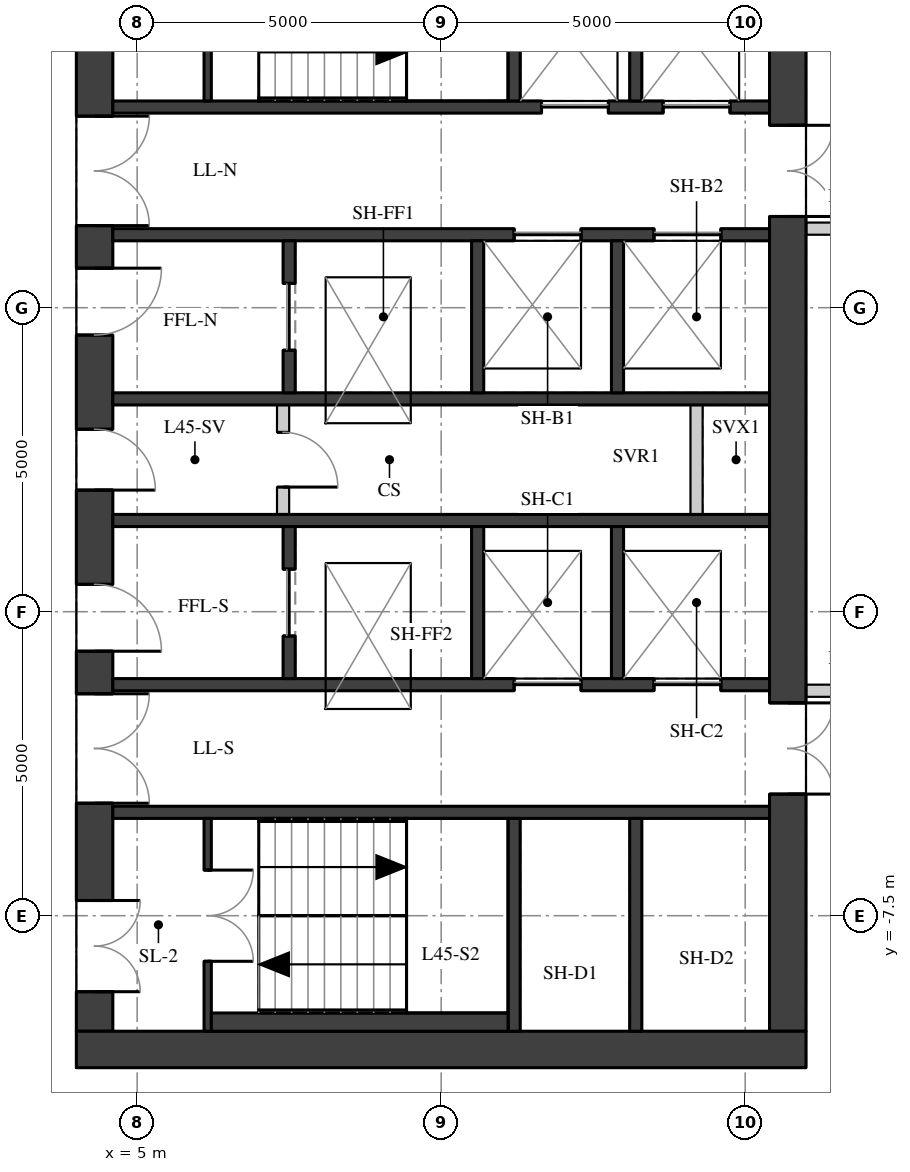
"""IFC4 building model, lengths in metres.
Left out: names, types, materials, properties, quantities, classifications, styles, units other than length and angle.
Written with IfcOpenShell. Run it as: python <this file> out.ifc"""

import sys

from ifc_helpers import new_model, si_unit, direction, frame, frame_2d, origin, place, context, subcontext, project, spatial, rectangle, extrude, element, fill, save


model = new_model("IFC4")
c1 = context("Model", 3, precision=1e-05, world=origin(), true_north=direction((0.0, 1.0)))
c2 = subcontext(c1, "Body", "Model", "MODEL_VIEW")
j1 = project(units=[si_unit("LENGTHUNIT", "METRE"), si_unit("PLANEANGLEUNIT", "RADIAN")], contexts=[c1])
p1 = place(None, origin())
s1 = spatial("IfcSite", under=j1, at=p1, CompositionType="ELEMENT")
p2 = place(p1, origin())
s2 = spatial("IfcBuilding", under=s1, at=p2, CompositionType="ELEMENT")
p3 = place(p2, frame((0.0, 0.0, 161.6)))
s3 = spatial("IfcBuildingStorey", under=s2, at=p3, CompositionType="ELEMENT", Elevation=161.6)
p4 = place(p3, frame((4.3, -9.4, 0.0), z_axis=(0.0, 0.0, 1.0), x_axis=(0.0, 1.0, 0.0)))
e1 = element("IfcWall", 1, at=p4, inside=s3, PredefinedType="SHEAR", context=c2, shape_type="SweptSolid", body=[
    extrude(rectangle(XDim=18.8, YDim=0.6, at=frame_2d((9.4, 0.0))), origin(), (0.0, 0.0, 1.0), 3.02),
])
p5 = place(p4, frame((0.65, 0.0, 0.0)))
e2 = element("IfcOpeningElement", 2, at=p5, cuts=e1, PredefinedType="OPENING", context=c2, shape_type="SweptSolid", body=[
    extrude(rectangle(XDim=1.5, YDim=2.1, at=frame_2d((0.75, 1.05))), frame((0.0, 0.31, 0.0), z_axis=(0.0, -1.0, 0.0), x_axis=(1.0, 0.0, 0.0)), (0.0, 0.0, 1.0), 0.62),
])
p6 = place(p4, frame((3.75, 0.0, 0.0)))
e3 = element("IfcOpeningElement", 3, at=p6, cuts=e1, PredefinedType="OPENING", context=c2, shape_type="SweptSolid", body=[
    extrude(rectangle(XDim=1.8, YDim=2.1, at=frame_2d((0.9, 1.05))), frame((0.0, 0.31, 0.0), z_axis=(0.0, -1.0, 0.0), x_axis=(1.0, 0.0, 0.0)), (0.0, 0.0, 1.0), 0.62),
])
p7 = place(p4, frame((6.25, 0.0, 0.0)))
e4 = element("IfcOpeningElement", 4, at=p7, cuts=e1, PredefinedType="OPENING", context=c2, shape_type="SweptSolid", body=[
    extrude(rectangle(XDim=1.1, YDim=2.1, at=frame_2d((0.55, 1.05))), frame((0.0, 0.31, 0.0), z_axis=(0.0, -1.0, 0.0), x_axis=(1.0, 0.0, 0.0)), (0.0, 0.0, 1.0), 0.62),
])
p8 = place(p4, frame((8.9, 0.0, 0.0)))
e5 = element("IfcOpeningElement", 5, at=p8, cuts=e1, PredefinedType="OPENING", context=c2, shape_type="SweptSolid", body=[
    extrude(rectangle(XDim=1.0, YDim=2.1, at=frame_2d((0.5, 1.05))), frame((0.0, 0.31, 0.0), z_axis=(0.0, -1.0, 0.0), x_axis=(1.0, 0.0, 0.0)), (0.0, 0.0, 1.0), 0.62),
])
p9 = place(p4, frame((11.45, 0.0, 0.0)))
e6 = element("IfcOpeningElement", 6, at=p9, cuts=e1, PredefinedType="OPENING", context=c2, shape_type="SweptSolid", body=[
    extrude(rectangle(XDim=1.1, YDim=2.1, at=frame_2d((0.55, 1.05))), frame((0.0, 0.31, 0.0), z_axis=(0.0, -1.0, 0.0), x_axis=(1.0, 0.0, 0.0)), (0.0, 0.0, 1.0), 0.62),
])
p10 = place(p4, frame((13.25, 0.0, 0.0)))
e7 = element("IfcOpeningElement", 7, at=p10, cuts=e1, PredefinedType="OPENING", context=c2, shape_type="SweptSolid", body=[
    extrude(rectangle(XDim=1.8, YDim=2.1, at=frame_2d((0.9, 1.05))), frame((0.0, 0.31, 0.0), z_axis=(0.0, -1.0, 0.0), x_axis=(1.0, 0.0, 0.0)), (0.0, 0.0, 1.0), 0.62),
])
p11 = place(p4, frame((16.65, 0.0, 0.0)))
e8 = element("IfcOpeningElement", 8, at=p11, cuts=e1, PredefinedType="OPENING", context=c2, shape_type="SweptSolid", body=[
    extrude(rectangle(XDim=1.5, YDim=2.1, at=frame_2d((0.75, 1.05))), frame((0.0, 0.31, 0.0), z_axis=(0.0, -1.0, 0.0), x_axis=(1.0, 0.0, 0.0)), (0.0, 0.0, 1.0), 0.62),
])
p12 = place(p3, frame((15.7, -9.4, 0.0), z_axis=(0.0, 0.0, 1.0), x_axis=(0.0, 1.0, 0.0)))
e9 = element("IfcWall", 9, at=p12, inside=s3, PredefinedType="SHEAR", context=c2, shape_type="SweptSolid", body=[
    extrude(rectangle(XDim=18.8, YDim=0.6, at=frame_2d((9.4, 0.0))), origin(), (0.0, 0.0, 1.0), 3.02),
])
p13 = place(p12, frame((13.4, 0.0, 0.0)))
e10 = element("IfcOpeningElement", 10, at=p13, cuts=e9, PredefinedType="OPENING", context=c2, shape_type="SweptSolid", body=[
    extrude(rectangle(XDim=1.5, YDim=2.1, at=frame_2d((0.75, 1.05))), frame((0.0, 0.31, 0.0), z_axis=(0.0, -1.0, 0.0), x_axis=(1.0, 0.0, 0.0)), (0.0, 0.0, 1.0), 0.62),
])
p14 = place(p12, frame((3.9, 0.0, 0.0)))
e11 = element("IfcOpeningElement", 11, at=p14, cuts=e9, PredefinedType="OPENING", context=c2, shape_type="SweptSolid", body=[
    extrude(rectangle(XDim=1.5, YDim=2.1, at=frame_2d((0.75, 1.05))), frame((0.0, 0.31, 0.0), z_axis=(0.0, -1.0, 0.0), x_axis=(1.0, 0.0, 0.0)), (0.0, 0.0, 1.0), 0.62),
])
p15 = place(p3, frame((4.0, -9.7, 0.0), z_axis=(0.0, 0.0, 1.0), x_axis=(1.0, 0.0, 0.0)))
e12 = element("IfcWall", 12, at=p15, inside=s3, PredefinedType="SHEAR", context=c2, shape_type="SweptSolid", body=[
    extrude(rectangle(XDim=12.0, YDim=0.6, at=frame_2d((6.0, 0.0))), origin(), (0.0, 0.0, 1.0), 3.02),
])
p16 = place(p3, frame((4.6, 5.8, 0.0), z_axis=(0.0, 0.0, 1.0), x_axis=(1.0, 0.0, 0.0)))
e13 = element("IfcWall", 13, at=p16, inside=s3, PredefinedType="SHEAR", context=c2, shape_type="SweptSolid", body=[
    extrude(rectangle(XDim=10.8, YDim=0.2, at=frame_2d((5.4, 0.0))), origin(), (0.0, 0.0, 1.0), 3.02),
])
p17 = place(p16, frame((7.05, 0.0, 0.0)))
e14 = element("IfcOpeningElement", 14, at=p17, cuts=e13, PredefinedType="OPENING", context=c2, shape_type="SweptSolid", body=[
    extrude(rectangle(XDim=1.1, YDim=2.1, at=frame_2d((0.55, 1.05))), frame((0.0, 0.11, 0.0), z_axis=(0.0, -1.0, 0.0), x_axis=(1.0, 0.0, 0.0)), (0.0, 0.0, 1.0), 0.22),
])
p18 = place(p16, frame((9.05, 0.0, 0.0)))
e15 = element("IfcOpeningElement", 15, at=p18, cuts=e13, PredefinedType="OPENING", context=c2, shape_type="SweptSolid", body=[
    extrude(rectangle(XDim=1.1, YDim=2.1, at=frame_2d((0.55, 1.05))), frame((0.0, 0.11, 0.0), z_axis=(0.0, -1.0, 0.0), x_axis=(1.0, 0.0, 0.0)), (0.0, 0.0, 1.0), 0.22),
])
p19 = place(p3, frame((4.6, 3.7, 0.0), z_axis=(0.0, 0.0, 1.0), x_axis=(1.0, 0.0, 0.0)))
e16 = element("IfcWall", 16, at=p19, inside=s3, PredefinedType="SHEAR", context=c2, shape_type="SweptSolid", body=[
    extrude(rectangle(XDim=10.8, YDim=0.2, at=frame_2d((5.4, 0.0))), origin(), (0.0, 0.0, 1.0), 3.02),
])
p20 = place(p19, frame((6.6, 0.0, 0.0)))
e17 = element("IfcOpeningElement", 17, at=p20, cuts=e16, PredefinedType="OPENING", context=c2, shape_type="SweptSolid", body=[
    extrude(rectangle(XDim=1.1, YDim=2.1, at=frame_2d((0.55, 1.05))), frame((0.0, 0.11, 0.0), z_axis=(0.0, -1.0, 0.0), x_axis=(1.0, 0.0, 0.0)), (0.0, 0.0, 1.0), 0.22),
])
p21 = place(p19, frame((8.9, 0.0, 0.0)))
e18 = element("IfcOpeningElement", 18, at=p21, cuts=e16, PredefinedType="OPENING", context=c2, shape_type="SweptSolid", body=[
    extrude(rectangle(XDim=1.1, YDim=2.1, at=frame_2d((0.55, 1.05))), frame((0.0, 0.11, 0.0), z_axis=(0.0, -1.0, 0.0), x_axis=(1.0, 0.0, 0.0)), (0.0, 0.0, 1.0), 0.22),
])
for number, where, z_axis, x_axis in (
    (19, (4.6, 1.0, 0.0), (0.0, 0.0, 1.0), (1.0, 0.0, 0.0)),
    (20, (4.6, -1.0, 0.0), (0.0, 0.0, 1.0), (1.0, 0.0, 0.0)),
):
    element("IfcWall", number, at=place(p3, frame(where, z_axis=z_axis, x_axis=x_axis)), inside=s3, PredefinedType="SHEAR", context=c2, shape_type="SweptSolid", body=[
        extrude(rectangle(XDim=10.8, YDim=0.2, at=frame_2d((5.4, 0.0))), origin(), (0.0, 0.0, 1.0), 3.02),
    ])
p22 = place(p3, frame((4.6, -3.7, 0.0), z_axis=(0.0, 0.0, 1.0), x_axis=(1.0, 0.0, 0.0)))
e21 = element("IfcWall", 21, at=p22, inside=s3, PredefinedType="SHEAR", context=c2, shape_type="SweptSolid", body=[
    extrude(rectangle(XDim=10.8, YDim=0.2, at=frame_2d((5.4, 0.0))), origin(), (0.0, 0.0, 1.0), 3.02),
])
p23 = place(p22, frame((6.6, 0.0, 0.0)))
e22 = element("IfcOpeningElement", 22, at=p23, cuts=e21, PredefinedType="OPENING", context=c2, shape_type="SweptSolid", body=[
    extrude(rectangle(XDim=1.1, YDim=2.1, at=frame_2d((0.55, 1.05))), frame((0.0, 0.11, 0.0), z_axis=(0.0, -1.0, 0.0), x_axis=(1.0, 0.0, 0.0)), (0.0, 0.0, 1.0), 0.22),
])
p24 = place(p22, frame((8.9, 0.0, 0.0)))
e23 = element("IfcOpeningElement", 23, at=p24, cuts=e21, PredefinedType="OPENING", context=c2, shape_type="SweptSolid", body=[
    extrude(rectangle(XDim=1.1, YDim=2.1, at=frame_2d((0.55, 1.05))), frame((0.0, 0.11, 0.0), z_axis=(0.0, -1.0, 0.0), x_axis=(1.0, 0.0, 0.0)), (0.0, 0.0, 1.0), 0.22),
])
p25 = place(p3, frame((4.6, -5.8, 0.0), z_axis=(0.0, 0.0, 1.0), x_axis=(1.0, 0.0, 0.0)))
e24 = element("IfcWall", 24, at=p25, inside=s3, PredefinedType="SHEAR", context=c2, shape_type="SweptSolid", body=[
    extrude(rectangle(XDim=10.8, YDim=0.2, at=frame_2d((5.4, 0.0))), origin(), (0.0, 0.0, 1.0), 3.02),
])
for number, where, z_axis, x_axis in (
    (25, (11.2, 5.9, 0.0), (0.0, 0.0, 1.0), (0.0, 1.0, 0.0)),
    (26, (11.2, -9.4, 0.0), (0.0, 0.0, 1.0), (0.0, 1.0, 0.0)),
    (27, (13.2, 5.9, 0.0), (0.0, 0.0, 1.0), (0.0, 1.0, 0.0)),
    (28, (13.2, -9.4, 0.0), (0.0, 0.0, 1.0), (0.0, 1.0, 0.0)),
):
    element("IfcWall", number, at=place(p3, frame(where, z_axis=z_axis, x_axis=x_axis)), inside=s3, PredefinedType="SHEAR", context=c2, shape_type="SweptSolid", body=[
        extrude(rectangle(XDim=3.5, YDim=0.2, at=frame_2d((1.75, 0.0))), origin(), (0.0, 0.0, 1.0), 3.02),
    ])
p26 = place(p3, frame((7.5, 1.1, 0.0), z_axis=(0.0, 0.0, 1.0), x_axis=(0.0, 1.0, 0.0)))
e29 = element("IfcWall", 29, at=p26, inside=s3, PredefinedType="SHEAR", context=c2, shape_type="SweptSolid", body=[
    extrude(rectangle(XDim=2.5, YDim=0.2, at=frame_2d((1.25, 0.0))), origin(), (0.0, 0.0, 1.0), 3.02),
])
p27 = place(p26, frame((0.7, 0.0, 0.0)))
e30 = element("IfcOpeningElement", 30, at=p27, cuts=e29, PredefinedType="OPENING", context=c2, shape_type="SweptSolid", body=[
    extrude(rectangle(XDim=1.1, YDim=2.1, at=frame_2d((0.55, 1.05))), frame((0.0, 0.11, 0.0), z_axis=(0.0, -1.0, 0.0), x_axis=(1.0, 0.0, 0.0)), (0.0, 0.0, 1.0), 0.22),
])
p28 = place(p3, frame((7.5, -3.6, 0.0), z_axis=(0.0, 0.0, 1.0), x_axis=(0.0, 1.0, 0.0)))
e31 = element("IfcWall", 31, at=p28, inside=s3, PredefinedType="SHEAR", context=c2, shape_type="SweptSolid", body=[
    extrude(rectangle(XDim=2.5, YDim=0.2, at=frame_2d((1.25, 0.0))), origin(), (0.0, 0.0, 1.0), 3.02),
])
p29 = place(p28, frame((0.7, 0.0, 0.0)))
e32 = element("IfcOpeningElement", 32, at=p29, cuts=e31, PredefinedType="OPENING", context=c2, shape_type="SweptSolid", body=[
    extrude(rectangle(XDim=1.1, YDim=2.1, at=frame_2d((0.55, 1.05))), frame((0.0, 0.11, 0.0), z_axis=(0.0, -1.0, 0.0), x_axis=(1.0, 0.0, 0.0)), (0.0, 0.0, 1.0), 0.22),
])
for number, where, z_axis, x_axis in (
    (33, (10.6, 1.1, 0.0), (0.0, 0.0, 1.0), (0.0, 1.0, 0.0)),
    (34, (10.6, -3.6, 0.0), (0.0, 0.0, 1.0), (0.0, 1.0, 0.0)),
    (35, (12.9, 1.1, 0.0), (0.0, 0.0, 1.0), (0.0, 1.0, 0.0)),
    (36, (12.9, -3.6, 0.0), (0.0, 0.0, 1.0), (0.0, 1.0, 0.0)),
):
    element("IfcWall", number, at=place(p3, frame(where, z_axis=z_axis, x_axis=x_axis)), inside=s3, PredefinedType="SHEAR", context=c2, shape_type="SweptSolid", body=[
        extrude(rectangle(XDim=2.5, YDim=0.2, at=frame_2d((1.25, 0.0))), origin(), (0.0, 0.0, 1.0), 3.02),
    ])
p30 = place(p3, frame((6.16, 5.9, 0.0), z_axis=(0.0, 0.0, 1.0), x_axis=(0.0, 1.0, 0.0)))
e37 = element("IfcWall", 37, at=p30, inside=s3, PredefinedType="SHEAR", context=c2, shape_type="SweptSolid", body=[
    extrude(rectangle(XDim=3.5, YDim=0.12, at=frame_2d((1.75, 0.0))), origin(), (0.0, 0.0, 1.0), 3.02),
])
p31 = place(p30, frame((0.85, 0.0, 0.0)))
e38 = element("IfcOpeningElement", 38, at=p31, cuts=e37, PredefinedType="OPENING", context=c2, shape_type="SweptSolid", body=[
    extrude(rectangle(XDim=1.5, YDim=2.1, at=frame_2d((0.75, 1.05))), frame((0.0, 0.07, 0.0), z_axis=(0.0, -1.0, 0.0), x_axis=(1.0, 0.0, 0.0)), (0.0, 0.0, 1.0), 0.14),
])
p32 = place(p3, frame((6.16, -9.4, 0.0), z_axis=(0.0, 0.0, 1.0), x_axis=(0.0, 1.0, 0.0)))
e39 = element("IfcWall", 39, at=p32, inside=s3, PredefinedType="SHEAR", context=c2, shape_type="SweptSolid", body=[
    extrude(rectangle(XDim=3.5, YDim=0.12, at=frame_2d((1.75, 0.0))), origin(), (0.0, 0.0, 1.0), 3.02),
])
p33 = place(p32, frame((1.15, 0.0, 0.0)))
e40 = element("IfcOpeningElement", 40, at=p33, cuts=e39, PredefinedType="OPENING", context=c2, shape_type="SweptSolid", body=[
    extrude(rectangle(XDim=1.5, YDim=2.1, at=frame_2d((0.75, 1.05))), frame((0.0, 0.07, 0.0), z_axis=(0.0, -1.0, 0.0), x_axis=(1.0, 0.0, 0.0)), (0.0, 0.0, 1.0), 0.14),
])
p34 = place(p3, frame((7.4, -0.9, 0.0), z_axis=(0.0, 0.0, 1.0), x_axis=(0.0, 1.0, 0.0)))
e41 = element("IfcWall", 41, at=p34, inside=s3, PredefinedType="PARTITIONING", context=c2, shape_type="SweptSolid", body=[
    extrude(rectangle(XDim=1.8, YDim=0.2, at=frame_2d((0.9, 0.0))), origin(), (0.0, 0.0, 1.0), 3.02),
])
p35 = place(p34, frame((0.45, 0.0, 0.0)))
e42 = element("IfcOpeningElement", 42, at=p35, cuts=e41, PredefinedType="OPENING", context=c2, shape_type="SweptSolid", body=[
    extrude(rectangle(XDim=0.9, YDim=2.1, at=frame_2d((0.45, 1.05))), frame((0.0, 0.11, 0.0), z_axis=(0.0, -1.0, 0.0), x_axis=(1.0, 0.0, 0.0)), (0.0, 0.0, 1.0), 0.22),
])
p36 = place(p3, frame((14.2, -0.9, 0.0), z_axis=(0.0, 0.0, 1.0), x_axis=(0.0, 1.0, 0.0)))
e43 = element("IfcWall", 43, at=p36, inside=s3, PredefinedType="PARTITIONING", context=c2, shape_type="SweptSolid", body=[
    extrude(rectangle(XDim=1.8, YDim=0.2, at=frame_2d((0.9, 0.0))), origin(), (0.0, 0.0, 1.0), 3.02),
])
p37 = place(p3, frame((6.22, -9.25, 0.0), z_axis=(0.0, 0.0, 1.0), x_axis=(1.0, 0.0, 0.0)))
e44 = element("IfcWall", 44, at=p37, inside=s3, PredefinedType="PARTITIONING", context=c2, shape_type="SweptSolid", body=[
    extrude(rectangle(XDim=4.88, YDim=0.3, at=frame_2d((2.44, 0.0))), origin(), (0.0, 0.0, 1.0), 3.02),
])
for number, where, z_axis, x_axis in (
    (45, (17.6, 3.8, 0.0), (0.0, 0.0, 1.0), (-1.0, 0.0, 0.0)),
    (46, (16.004, -3.8, 0.0), (0.0, 0.0, 1.0), (1.0, 0.0, 0.0)),
):
    element("IfcWall", number, at=place(p3, frame(where, z_axis=z_axis, x_axis=x_axis)), inside=s3, PredefinedType="PARTITIONING", context=c2, shape_type="SweptSolid", body=[
        extrude(rectangle(XDim=1.596, YDim=0.2, at=frame_2d((0.798, 0.0))), origin(), (0.0, 0.0, 1.0), 2.57),
    ])
p38 = place(p5, origin())
e47 = element("IfcDoor", 47, at=p38, inside=s3, OperationType="DOUBLE_DOOR_SINGLE_SWING", PredefinedType="DOOR", context=c2, shape_type="SweptSolid", body=[
    extrude(rectangle(XDim=1.5, YDim=2.1, at=frame_2d((0.75, 1.05))), frame((0.0, 0.025, 0.0), z_axis=(0.0, -1.0, 0.0), x_axis=(1.0, 0.0, 0.0)), (0.0, 0.0, 1.0), 0.05),
])
fill(e2, e47)
p39 = place(p6, origin())
e48 = element("IfcDoor", 48, at=p39, inside=s3, OperationType="DOUBLE_DOOR_SINGLE_SWING", PredefinedType="DOOR", context=c2, shape_type="SweptSolid", body=[
    extrude(rectangle(XDim=1.8, YDim=2.1, at=frame_2d((0.9, 1.05))), frame((0.0, 0.025, 0.0), z_axis=(0.0, -1.0, 0.0), x_axis=(1.0, 0.0, 0.0)), (0.0, 0.0, 1.0), 0.05),
])
fill(e3, e48)
p40 = place(p7, origin())
e49 = element("IfcDoor", 49, at=p40, inside=s3, OperationType="SINGLE_SWING_RIGHT", PredefinedType="DOOR", context=c2, shape_type="SweptSolid", body=[
    extrude(rectangle(XDim=1.1, YDim=2.1, at=frame_2d((0.55, 1.05))), frame((0.0, 0.025, 0.0), z_axis=(0.0, -1.0, 0.0), x_axis=(1.0, 0.0, 0.0)), (0.0, 0.0, 1.0), 0.05),
])
fill(e4, e49)
p41 = place(p8, origin())
e50 = element("IfcDoor", 50, at=p41, inside=s3, OperationType="SINGLE_SWING_RIGHT", PredefinedType="DOOR", context=c2, shape_type="SweptSolid", body=[
    extrude(rectangle(XDim=1.0, YDim=2.1, at=frame_2d((0.5, 1.05))), frame((0.0, 0.025, 0.0), z_axis=(0.0, -1.0, 0.0), x_axis=(1.0, 0.0, 0.0)), (0.0, 0.0, 1.0), 0.05),
])
fill(e5, e50)
p42 = place(p9, origin())
e51 = element("IfcDoor", 51, at=p42, inside=s3, OperationType="SINGLE_SWING_LEFT", PredefinedType="DOOR", context=c2, shape_type="SweptSolid", body=[
    extrude(rectangle(XDim=1.1, YDim=2.1, at=frame_2d((0.55, 1.05))), frame((0.0, 0.025, 0.0), z_axis=(0.0, -1.0, 0.0), x_axis=(1.0, 0.0, 0.0)), (0.0, 0.0, 1.0), 0.05),
])
fill(e6, e51)
p43 = place(p10, origin())
e52 = element("IfcDoor", 52, at=p43, inside=s3, OperationType="DOUBLE_DOOR_SINGLE_SWING", PredefinedType="DOOR", context=c2, shape_type="SweptSolid", body=[
    extrude(rectangle(XDim=1.8, YDim=2.1, at=frame_2d((0.9, 1.05))), frame((0.0, 0.025, 0.0), z_axis=(0.0, -1.0, 0.0), x_axis=(1.0, 0.0, 0.0)), (0.0, 0.0, 1.0), 0.05),
])
fill(e7, e52)
p44 = place(p13, origin())
e53 = element("IfcDoor", 53, at=p44, inside=s3, OperationType="DOUBLE_DOOR_SINGLE_SWING", PredefinedType="DOOR", context=c2, shape_type="SweptSolid", body=[
    extrude(rectangle(XDim=1.5, YDim=2.1, at=frame_2d((0.75, 1.05))), frame((0.0, 0.025, 0.0), z_axis=(0.0, -1.0, 0.0), x_axis=(1.0, 0.0, 0.0)), (0.0, 0.0, 1.0), 0.05),
])
fill(e10, e53)
p45 = place(p14, origin())
e54 = element("IfcDoor", 54, at=p45, inside=s3, OperationType="DOUBLE_DOOR_SINGLE_SWING", PredefinedType="DOOR", context=c2, shape_type="SweptSolid", body=[
    extrude(rectangle(XDim=1.5, YDim=2.1, at=frame_2d((0.75, 1.05))), frame((0.0, 0.025, 0.0), z_axis=(0.0, -1.0, 0.0), x_axis=(1.0, 0.0, 0.0)), (0.0, 0.0, 1.0), 0.05),
])
fill(e11, e54)
p46 = place(p33, origin())
e55 = element("IfcDoor", 55, at=p46, inside=s3, OperationType="DOUBLE_DOOR_SINGLE_SWING", PredefinedType="DOOR", context=c2, shape_type="SweptSolid", body=[
    extrude(rectangle(XDim=1.5, YDim=2.1, at=frame_2d((0.75, 1.05))), frame((0.0, 0.025, 0.0), z_axis=(0.0, -1.0, 0.0), x_axis=(1.0, 0.0, 0.0)), (0.0, 0.0, 1.0), 0.05),
])
fill(e40, e55)
p47 = place(p17, origin())
e56 = element("IfcDoor", 56, at=p47, inside=s3, OperationType="DOUBLE_DOOR_SLIDING", PredefinedType="DOOR", context=c2, shape_type="SweptSolid", body=[
    extrude(rectangle(XDim=1.1, YDim=2.1, at=frame_2d((0.55, 1.05))), frame((0.0, 0.025, 0.0), z_axis=(0.0, -1.0, 0.0), x_axis=(1.0, 0.0, 0.0)), (0.0, 0.0, 1.0), 0.05),
])
fill(e14, e56)
p48 = place(p18, origin())
e57 = element("IfcDoor", 57, at=p48, inside=s3, OperationType="DOUBLE_DOOR_SLIDING", PredefinedType="DOOR", context=c2, shape_type="SweptSolid", body=[
    extrude(rectangle(XDim=1.1, YDim=2.1, at=frame_2d((0.55, 1.05))), frame((0.0, 0.025, 0.0), z_axis=(0.0, -1.0, 0.0), x_axis=(1.0, 0.0, 0.0)), (0.0, 0.0, 1.0), 0.05),
])
fill(e15, e57)
p49 = place(p20, origin())
e58 = element("IfcDoor", 58, at=p49, inside=s3, OperationType="DOUBLE_DOOR_SLIDING", PredefinedType="DOOR", context=c2, shape_type="SweptSolid", body=[
    extrude(rectangle(XDim=1.1, YDim=2.1, at=frame_2d((0.55, 1.05))), frame((0.0, 0.025, 0.0), z_axis=(0.0, -1.0, 0.0), x_axis=(1.0, 0.0, 0.0)), (0.0, 0.0, 1.0), 0.05),
])
fill(e17, e58)
p50 = place(p21, origin())
e59 = element("IfcDoor", 59, at=p50, inside=s3, OperationType="DOUBLE_DOOR_SLIDING", PredefinedType="DOOR", context=c2, shape_type="SweptSolid", body=[
    extrude(rectangle(XDim=1.1, YDim=2.1, at=frame_2d((0.55, 1.05))), frame((0.0, 0.025, 0.0), z_axis=(0.0, -1.0, 0.0), x_axis=(1.0, 0.0, 0.0)), (0.0, 0.0, 1.0), 0.05),
])
fill(e18, e59)
p51 = place(p23, origin())
e60 = element("IfcDoor", 60, at=p51, inside=s3, OperationType="DOUBLE_DOOR_SLIDING", PredefinedType="DOOR", context=c2, shape_type="SweptSolid", body=[
    extrude(rectangle(XDim=1.1, YDim=2.1, at=frame_2d((0.55, 1.05))), frame((0.0, 0.025, 0.0), z_axis=(0.0, -1.0, 0.0), x_axis=(1.0, 0.0, 0.0)), (0.0, 0.0, 1.0), 0.05),
])
fill(e22, e60)
p52 = place(p24, origin())
e61 = element("IfcDoor", 61, at=p52, inside=s3, OperationType="DOUBLE_DOOR_SLIDING", PredefinedType="DOOR", context=c2, shape_type="SweptSolid", body=[
    extrude(rectangle(XDim=1.1, YDim=2.1, at=frame_2d((0.55, 1.05))), frame((0.0, 0.025, 0.0), z_axis=(0.0, -1.0, 0.0), x_axis=(1.0, 0.0, 0.0)), (0.0, 0.0, 1.0), 0.05),
])
fill(e23, e61)
p53 = place(p27, origin())
e62 = element("IfcDoor", 62, at=p53, inside=s3, OperationType="DOUBLE_DOOR_SLIDING", PredefinedType="DOOR", context=c2, shape_type="SweptSolid", body=[
    extrude(rectangle(XDim=1.1, YDim=2.1, at=frame_2d((0.55, 1.05))), frame((0.0, 0.025, 0.0), z_axis=(0.0, -1.0, 0.0), x_axis=(1.0, 0.0, 0.0)), (0.0, 0.0, 1.0), 0.05),
])
fill(e30, e62)
p54 = place(p29, origin())
e63 = element("IfcDoor", 63, at=p54, inside=s3, OperationType="DOUBLE_DOOR_SLIDING", PredefinedType="DOOR", context=c2, shape_type="SweptSolid", body=[
    extrude(rectangle(XDim=1.1, YDim=2.1, at=frame_2d((0.55, 1.05))), frame((0.0, 0.025, 0.0), z_axis=(0.0, -1.0, 0.0), x_axis=(1.0, 0.0, 0.0)), (0.0, 0.0, 1.0), 0.05),
])
fill(e32, e63)
p55 = place(p35, origin())
e64 = element("IfcDoor", 64, at=p55, inside=s3, OperationType="SINGLE_SWING_RIGHT", PredefinedType="DOOR", context=c2, shape_type="SweptSolid", body=[
    extrude(rectangle(XDim=0.9, YDim=2.1, at=frame_2d((0.45, 1.05))), frame((0.0, 0.025, 0.0), z_axis=(0.0, -1.0, 0.0), x_axis=(1.0, 0.0, 0.0)), (0.0, 0.0, 1.0), 0.05),
])
fill(e42, e64)
save(model, sys.argv[1])
